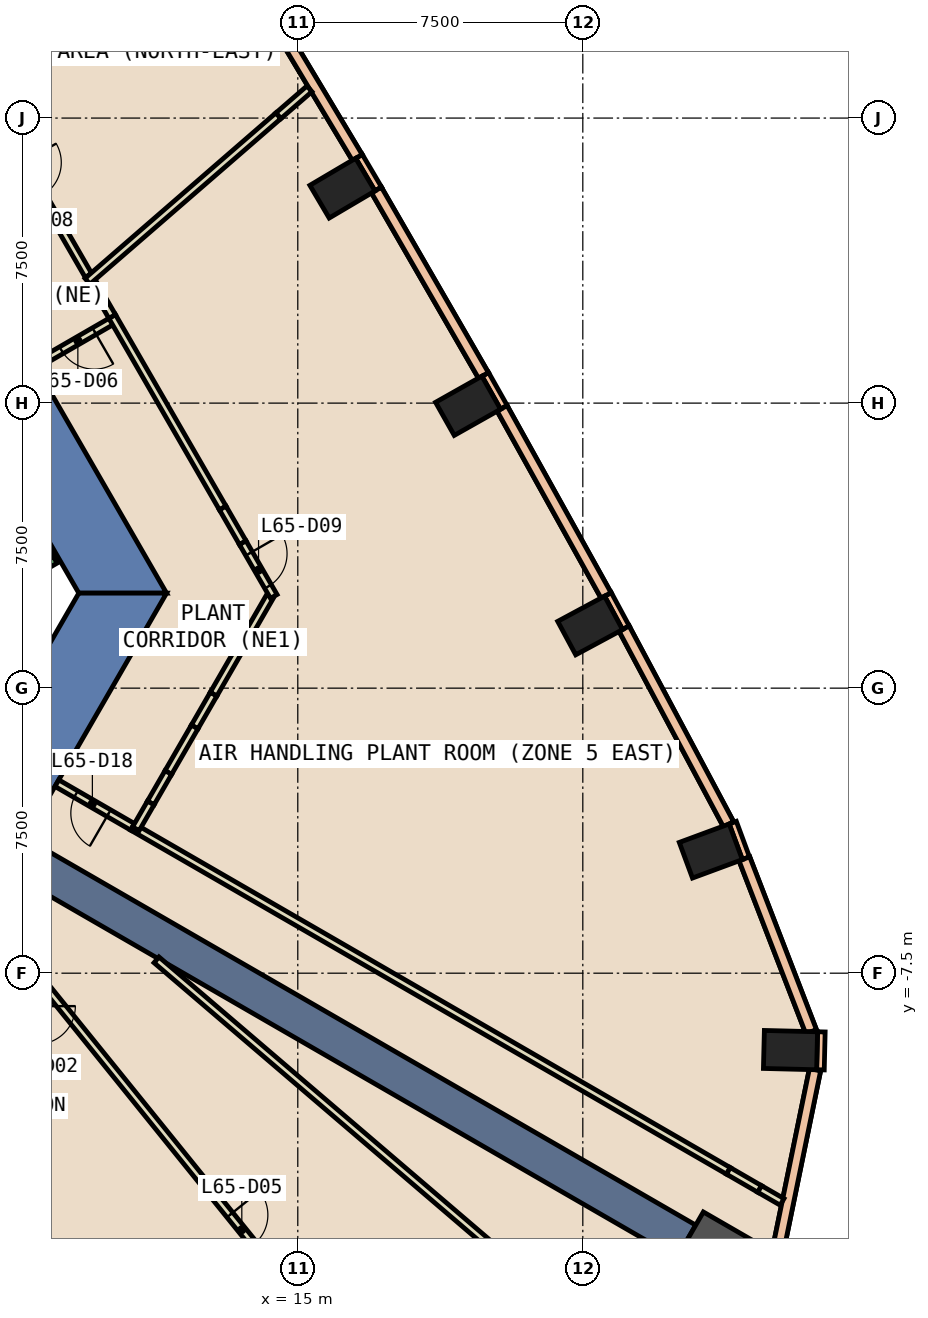
"""IFC4 building model, lengths in metres.
Left out: names, types, materials, properties, quantities, classifications, styles, units other than length and angle.
Written with IfcOpenShell. Run it as: python <this file> out.ifc"""

import sys

from ifc_helpers import new_model, si_unit, direction, frame, frame_2d, origin, origin_2d, place, context, subcontext, project, spatial, polyline, rectangle, outline, extrude, element, fill, save


model = new_model("IFC4")
c1 = context("Model", 3, precision=1e-05, world=origin(), true_north=direction((0.0, 1.0)))
c2 = subcontext(c1, "Body", "Model", "MODEL_VIEW")
j1 = project(units=[si_unit("LENGTHUNIT", "METRE"), si_unit("PLANEANGLEUNIT", "RADIAN")], contexts=[c1])
p1 = place(None, origin())
s1 = spatial("IfcSite", under=j1, at=p1, CompositionType="ELEMENT")
p2 = place(p1, origin())
s2 = spatial("IfcBuilding", under=s1, at=p2, CompositionType="ELEMENT")
p3 = place(p2, frame((0.0, 0.0, 281.0)))
s3 = spatial("IfcBuildingStorey", under=s2, at=p3, CompositionType="ELEMENT", Elevation=281.0)
p4 = place(p3, frame((26.001, -15.012, -0.6), z_axis=(0.0, 0.0, 1.0), x_axis=(-0.866025403784, 0.5, 0.0)))
e1 = element("IfcColumn", 1, at=p4, inside=s3, PredefinedType="COLUMN", context=c2, shape_type="SweptSolid", body=[
    extrude(rectangle(XDim=1.8, YDim=1.8, at=origin_2d()), origin(), (0.0, 0.0, 1.0), 5.4),
])
for number, where, z_axis, x_axis in (
    (2, (27.965, -9.524, -0.6), (0.0, 0.0, 1.0), (0.025, 1.0, 0.0)),
    (3, (25.869, -4.285, -0.6), (0.0, 0.0, 1.0), (-0.347, 0.938, 0.0)),
    (4, (22.693, 1.649, -0.6), (0.0, 0.0, 1.0), (-0.474, 0.881, 0.0)),
    (5, (19.481, 7.43, -0.6), (0.0, 0.0, 1.0), (-0.491, 0.871, 0.0)),
    (6, (16.175, 13.156, -0.6), (0.0, 0.0, 1.0), (-0.509, 0.861, 0.0)),
):
    element("IfcColumn", number, at=place(p3, frame(where, z_axis=z_axis, x_axis=x_axis)), inside=s3, PredefinedType="COLUMN", context=c2, shape_type="SweptSolid", body=[
        extrude(rectangle(XDim=1.0, YDim=1.4, at=origin_2d()), origin(), (0.0, 0.0, 1.0), 5.4),
    ])
p5 = place(p3, frame((0.0, 0.0, -0.6)))
e7 = element("IfcWall", 7, at=p5, inside=s3, PredefinedType="SHEAR", context=c2, shape_type="SweptSolid", body=[
    extrude(outline(polyline([(6.786, 10.747), (5.054, 9.747), (9.238, 2.5), (11.547, 2.5), (6.786, 10.747)])), origin(), (0.0, 0.0, 1.0), 5.4),
])
p6 = place(p3, frame((0.0, 0.0, -0.6)))
e8 = element("IfcWall", 8, at=p6, inside=s3, PredefinedType="SHEAR", context=c2, shape_type="SweptSolid", body=[
    extrude(outline(polyline([(5.774, -7.5), (11.547, 2.5), (9.238, 2.5), (4.619, -5.5), (5.774, -7.5)])), origin(), (0.0, 0.0, 1.0), 5.4),
])
p7 = place(p3, frame((7.578, -4.375, 0.0), z_axis=(0.0, 0.0, 1.0), x_axis=(0.866020754303, -0.500008053052, 0.0)))
e9 = element("IfcWall", 9, at=p7, inside=s3, PredefinedType="SHEAR", context=c2, shape_type="SweptSolid", body=[
    extrude(rectangle(XDim=20.374, YDim=1.0, at=frame_2d((10.187, 0.0))), origin(), (0.0, 0.0, 1.0), 4.8),
])
p8 = place(p3, frame((26.793, -4.477, 0.0), z_axis=(0.0, 0.0, 1.0), x_axis=(-0.346892928577, 0.937904737222, 0.0)))
e10 = element("IfcWall", 10, at=p8, inside=s3, PredefinedType="STANDARD", context=c2, shape_type="SweptSolid", body=[
    extrude(rectangle(XDim=1.0, YDim=0.2, at=frame_2d((0.5, 0.0))), origin(), (0.0, 0.0, 1.0), 4.8),
])
for number, where, z_axis, x_axis in (
    (11, (23.634, 1.588, 0.0), (0.0, 0.0, 1.0), (-0.474, 0.881, 0.0)),
    (12, (20.424, 7.387, 0.0), (0.0, 0.0, 1.0), (-0.492, 0.871, 0.0)),
):
    element("IfcWall", number, at=place(p3, frame(where, z_axis=z_axis, x_axis=x_axis)), inside=s3, PredefinedType="STANDARD", context=c2, shape_type="SweptSolid", body=[
        extrude(rectangle(XDim=1.0, YDim=0.2, at=frame_2d((0.5, 0.0))), origin(), (0.0, 0.0, 1.0), 4.8),
    ])
p9 = place(p3, frame((17.118, 13.133, 0.0), z_axis=(0.0, 0.0, 1.0), x_axis=(-0.508087253435, 0.86130560366, 0.0)))
e13 = element("IfcWall", 13, at=p9, inside=s3, PredefinedType="STANDARD", context=c2, shape_type="SweptSolid", body=[
    extrude(rectangle(XDim=1.0, YDim=0.2, at=frame_2d((0.5, 0.0))), origin(), (0.0, 0.0, 1.0), 4.8),
])
p10 = place(p3, frame((28.753, -10.043, 0.0), z_axis=(0.0, 0.0, 1.0), x_axis=(0.024186470916, 0.999707464524, 0.0)))
e14 = element("IfcWall", 14, at=p10, inside=s3, PredefinedType="STANDARD", context=c2, shape_type="SweptSolid", body=[
    extrude(rectangle(XDim=0.999, YDim=0.2, at=frame_2d((0.5, 0.0))), origin(), (0.0, 0.0, 1.0), 4.8),
])
p11 = place(p3, frame((27.613, -14.905, 0.0), z_axis=(0.0, 0.0, 1.0), x_axis=(0.200924793816, 0.979606669654, 0.0)))
e15 = element("IfcWall", 15, at=p11, inside=s3, PredefinedType="STANDARD", context=c2, shape_type="SweptSolid", body=[
    extrude(rectangle(XDim=4.967, YDim=0.3, at=frame_2d((2.484, 0.0))), origin(), (0.0, 0.0, 1.0), 1.2),
])
p12 = place(p3, frame((27.613, -14.905, 4.0), z_axis=(0.0, 0.0, 1.0), x_axis=(0.200924793816, 0.979606669654, 0.0)))
e16 = element("IfcWall", 16, at=p12, inside=s3, PredefinedType="STANDARD", context=c2, shape_type="SweptSolid", body=[
    extrude(rectangle(XDim=4.967, YDim=0.3, at=frame_2d((2.484, 0.0))), origin(), (0.0, 0.0, 1.0), 0.8),
])
p13 = place(p3, frame((28.508, -9.038, 0.0), z_axis=(0.0, 0.0, 1.0), x_axis=(-0.360267544186, 0.932849021335, 0.0)))
e17 = element("IfcWall", 17, at=p13, inside=s3, PredefinedType="STANDARD", context=c2, shape_type="SweptSolid", body=[
    extrude(rectangle(XDim=4.875, YDim=0.3, at=frame_2d((2.437, 0.0))), origin(), (0.0, 0.0, 1.0), 1.2),
])
p14 = place(p3, frame((28.508, -9.038, 4.0), z_axis=(0.0, 0.0, 1.0), x_axis=(-0.360267544186, 0.932849021335, 0.0)))
e18 = element("IfcWall", 18, at=p14, inside=s3, PredefinedType="STANDARD", context=c2, shape_type="SweptSolid", body=[
    extrude(rectangle(XDim=4.875, YDim=0.3, at=frame_2d((2.437, 0.0))), origin(), (0.0, 0.0, 1.0), 0.8),
])
p15 = place(p3, frame((26.334, -3.581, 0.0), z_axis=(0.0, 0.0, 1.0), x_axis=(-0.470796778214, 0.882241686628, 0.0)))
e19 = element("IfcWall", 19, at=p15, inside=s3, PredefinedType="STANDARD", context=c2, shape_type="SweptSolid", body=[
    extrude(rectangle(XDim=5.833, YDim=0.3, at=frame_2d((2.917, 0.0))), origin(), (0.0, 0.0, 1.0), 1.2),
])
p16 = place(p3, frame((26.334, -3.581, 4.0), z_axis=(0.0, 0.0, 1.0), x_axis=(-0.470796778214, 0.882241686628, 0.0)))
e20 = element("IfcWall", 20, at=p16, inside=s3, PredefinedType="STANDARD", context=c2, shape_type="SweptSolid", body=[
    extrude(rectangle(XDim=5.833, YDim=0.3, at=frame_2d((2.917, 0.0))), origin(), (0.0, 0.0, 1.0), 0.8),
])
p17 = place(p3, frame((23.111, 2.441, 0.0), z_axis=(0.0, 0.0, 1.0), x_axis=(-0.485665023555, 0.874145002214, 0.0)))
e21 = element("IfcWall", 21, at=p17, inside=s3, PredefinedType="STANDARD", context=c2, shape_type="SweptSolid", body=[
    extrude(rectangle(XDim=5.63, YDim=0.3, at=frame_2d((2.815, 0.0))), origin(), (0.0, 0.0, 1.0), 1.2),
])
p18 = place(p3, frame((23.111, 2.441, 4.0), z_axis=(0.0, 0.0, 1.0), x_axis=(-0.485665023555, 0.874145002214, 0.0)))
e22 = element("IfcWall", 22, at=p18, inside=s3, PredefinedType="STANDARD", context=c2, shape_type="SweptSolid", body=[
    extrude(rectangle(XDim=5.63, YDim=0.3, at=frame_2d((2.815, 0.0))), origin(), (0.0, 0.0, 1.0), 0.8),
])
p19 = place(p3, frame((19.885, 8.23, 0.0), z_axis=(0.0, 0.0, 1.0), x_axis=(-0.49997269499, 0.866041167766, 0.0)))
e23 = element("IfcWall", 23, at=p19, inside=s3, PredefinedType="STANDARD", context=c2, shape_type="SweptSolid", body=[
    extrude(rectangle(XDim=5.63, YDim=0.3, at=frame_2d((2.815, 0.0))), origin(), (0.0, 0.0, 1.0), 1.2),
])
p20 = place(p3, frame((19.885, 8.23, 4.0), z_axis=(0.0, 0.0, 1.0), x_axis=(-0.49997269499, 0.866041167766, 0.0)))
e24 = element("IfcWall", 24, at=p20, inside=s3, PredefinedType="STANDARD", context=c2, shape_type="SweptSolid", body=[
    extrude(rectangle(XDim=5.63, YDim=0.3, at=frame_2d((2.815, 0.0))), origin(), (0.0, 0.0, 1.0), 0.8),
])
p21 = place(p3, frame((16.564, 13.966, 0.0), z_axis=(0.0, 0.0, 1.0), x_axis=(-0.514272513936, 0.857626831092, 0.0)))
e25 = element("IfcWall", 25, at=p21, inside=s3, PredefinedType="STANDARD", context=c2, shape_type="SweptSolid", body=[
    extrude(rectangle(XDim=5.629, YDim=0.3, at=frame_2d((2.815, 0.0))), origin(), (0.0, 0.0, 1.0), 1.2),
])
p22 = place(p3, frame((16.564, 13.966, 4.0), z_axis=(0.0, 0.0, 1.0), x_axis=(-0.514272513936, 0.857626831092, 0.0)))
e26 = element("IfcWall", 26, at=p22, inside=s3, PredefinedType="STANDARD", context=c2, shape_type="SweptSolid", body=[
    extrude(rectangle(XDim=5.629, YDim=0.3, at=frame_2d((2.815, 0.0))), origin(), (0.0, 0.0, 1.0), 0.8),
])
p23 = place(p3, frame((8.084, -7.51, 0.0), z_axis=(0.0, 0.0, 1.0), x_axis=(0.628300137945, -0.777971038445, 0.0)))
e27 = element("IfcWall", 27, at=p23, inside=s3, PredefinedType="PARTITIONING", context=c2, shape_type="SweptSolid", body=[
    extrude(rectangle(XDim=16.141, YDim=0.2, at=frame_2d((8.07, 0.0))), origin(), (0.0, 0.0, 1.0), 4.8),
])
p24 = place(p23, frame((8.163, 0.0, 0.0)))
e28 = element("IfcOpeningElement", 28, at=p24, cuts=e27, PredefinedType="OPENING", context=c2, shape_type="SweptSolid", body=[
    extrude(rectangle(XDim=1.0, YDim=2.1, at=frame_2d((0.5, 1.05))), frame((0.0, 0.11, 0.0), z_axis=(0.0, -1.0, 0.0), x_axis=(1.0, 0.0, 0.0)), (0.0, 0.0, 1.0), 0.22),
])
p25 = place(p3, frame((11.282, -7.149, 0.0), z_axis=(0.0, 0.0, 1.0), x_axis=(0.759981627741, -0.64994455571, 0.0)))
e29 = element("IfcWall", 29, at=p25, inside=s3, PredefinedType="PARTITIONING", context=c2, shape_type="SweptSolid", body=[
    extrude(rectangle(XDim=17.222, YDim=0.2, at=frame_2d((8.611, 0.0))), origin(), (0.0, 0.0, 1.0), 4.8),
])
p26 = place(p3, frame((10.652, -3.65, 0.0), z_axis=(0.0, 0.0, 1.0), x_axis=(-0.866079547155, 0.499906209203, 0.0)))
e30 = element("IfcWall", 30, at=p26, inside=s3, PredefinedType="PARTITIONING", context=c2, shape_type="SweptSolid", body=[
    extrude(rectangle(XDim=2.3, YDim=0.2, at=frame_2d((1.15, 0.0))), origin(), (0.0, 0.0, 1.0), 4.8),
])
p27 = place(p26, frame((0.721, 0.0, 0.0)))
e31 = element("IfcOpeningElement", 31, at=p27, cuts=e30, PredefinedType="OPENING", context=c2, shape_type="SweptSolid", body=[
    extrude(rectangle(XDim=1.0, YDim=2.1, at=frame_2d((0.5, 1.05))), frame((0.0, 0.11, 0.0), z_axis=(0.0, -1.0, 0.0), x_axis=(1.0, 0.0, 0.0)), (0.0, 0.0, 1.0), 0.22),
])
p28 = place(p3, frame((10.652, -3.65, 0.0), z_axis=(0.0, 0.0, 1.0), x_axis=(0.86603131093, -0.499989768384, 0.0)))
e32 = element("IfcWall", 32, at=p28, inside=s3, PredefinedType="PARTITIONING", context=c2, shape_type="SweptSolid", body=[
    extrude(rectangle(XDim=18.104, YDim=0.2, at=frame_2d((9.052, 0.0))), origin(), (0.0, 0.0, 1.0), 4.8),
])
p29 = place(p3, frame((10.165, 9.693, 0.0), z_axis=(0.0, 0.0, 1.0), x_axis=(-0.865955154139, -0.50012165622, 0.0)))
e33 = element("IfcWall", 33, at=p29, inside=s3, PredefinedType="PARTITIONING", context=c2, shape_type="SweptSolid", body=[
    extrude(rectangle(XDim=2.4, YDim=0.2, at=frame_2d((1.2, 0.0))), origin(), (0.0, 0.0, 1.0), 2.4),
])
p30 = place(p29, frame((0.6, 0.0, 0.0)))
e34 = element("IfcOpeningElement", 34, at=p30, cuts=e33, PredefinedType="OPENING", context=c2, shape_type="SweptSolid", body=[
    extrude(rectangle(XDim=1.0, YDim=2.1, at=frame_2d((0.5, 1.05))), frame((0.0, 0.11, 0.0), z_axis=(0.0, -1.0, 0.0), x_axis=(1.0, 0.0, 0.0)), (0.0, 0.0, 1.0), 0.22),
])
p31 = place(p3, frame((9.592, 10.685, 0.0), z_axis=(0.0, 0.0, 1.0), x_axis=(0.500366091518, -0.865813937552, 0.0)))
e35 = element("IfcWall", 35, at=p31, inside=s3, PredefinedType="PARTITIONING", context=c2, shape_type="SweptSolid", body=[
    extrude(rectangle(XDim=0.23, YDim=0.2, at=frame_2d((0.115, 0.0))), origin(), (0.0, 0.0, 1.0), 4.8),
])
p32 = place(p3, frame((14.268, 2.413, 0.0), z_axis=(0.0, 0.0, 1.0), x_axis=(-0.500037910135, -0.866003515251, 0.0)))
e36 = element("IfcWall", 36, at=p32, inside=s3, PredefinedType="PARTITIONING", context=c2, shape_type="SweptSolid", body=[
    extrude(rectangle(XDim=2.97, YDim=0.2, at=frame_2d((1.485, 0.0))), origin(), (0.0, 0.0, 1.0), 4.8),
])
p33 = place(p3, frame((10.115, 9.78, 0.0), z_axis=(0.0, 0.0, 1.0), x_axis=(0.500005696091, -0.86602211512, 0.0)))
e37 = element("IfcWall", 37, at=p33, inside=s3, PredefinedType="PARTITIONING", context=c2, shape_type="SweptSolid", body=[
    extrude(rectangle(XDim=5.82, YDim=0.2, at=frame_2d((2.91, 0.0))), origin(), (0.0, 0.0, 1.0), 2.4),
])
p34 = place(p3, frame((15.307, 15.77, 0.0), z_axis=(0.0, 0.0, 1.0), x_axis=(-0.755555277279, -0.655084897533, 0.0)))
e38 = element("IfcWall", 38, at=p34, inside=s3, PredefinedType="PARTITIONING", context=c2, shape_type="SweptSolid", body=[
    extrude(rectangle(XDim=1.084, YDim=0.2, at=frame_2d((0.542, 0.0))), origin(), (0.0, 0.0, 1.0), 2.4),
])
p35 = place(p3, frame((26.331, -12.702, 0.0), z_axis=(0.0, 0.0, 1.0), x_axis=(0.865607892982, -0.500722453668, 0.0)))
e39 = element("IfcWall", 39, at=p35, inside=s3, PredefinedType="PARTITIONING", context=c2, shape_type="SweptSolid", body=[
    extrude(rectangle(XDim=0.951, YDim=0.2, at=frame_2d((0.475, 0.0))), origin(), (0.0, 0.0, 1.0), 2.4),
])
p36 = place(p3, frame((27.154, -13.178, 0.0), z_axis=(0.0, 0.0, 1.0), x_axis=(0.866316887664, -0.499494794916, 0.0)))
e40 = element("IfcWall", 40, at=p36, inside=s3, PredefinedType="PARTITIONING", context=c2, shape_type="SweptSolid", body=[
    extrude(rectangle(XDim=0.681, YDim=0.2, at=frame_2d((0.34, 0.0))), origin(), (0.0, 0.0, 1.0), 4.8),
])
p37 = place(p3, frame((6.871, 15.398, 0.0), z_axis=(0.0, 0.0, 1.0), x_axis=(0.500031573455, -0.866007174074, 0.0)))
e41 = element("IfcWall", 41, at=p37, inside=s3, PredefinedType="PARTITIONING", context=c2, shape_type="SweptSolid", body=[
    extrude(rectangle(XDim=5.241, YDim=0.2, at=frame_2d((2.621, 0.0))), origin(), (0.0, 0.0, 1.0), 4.8),
])
p38 = place(p37, frame((1.811, 0.0, 0.0)))
e42 = element("IfcOpeningElement", 42, at=p38, cuts=e41, PredefinedType="OPENING", context=c2, shape_type="SweptSolid", body=[
    extrude(rectangle(XDim=1.0, YDim=2.1, at=frame_2d((0.5, 1.05))), frame((0.0, 0.11, 0.0), z_axis=(0.0, -1.0, 0.0), x_axis=(1.0, 0.0, 0.0)), (0.0, 0.0, 1.0), 0.22),
])
p39 = place(p3, frame((9.707, 10.486, 0.0), z_axis=(0.0, 0.0, 1.0), x_axis=(0.500292562113, -0.865856427068, 0.0)))
e43 = element("IfcWall", 43, at=p39, inside=s3, PredefinedType="PARTITIONING", context=c2, shape_type="SweptSolid", body=[
    extrude(rectangle(XDim=0.815, YDim=0.2, at=frame_2d((0.408, 0.0))), origin(), (0.0, 0.0, 1.0), 2.4),
])
p40 = place(p3, frame((12.783, -0.159, 0.0), z_axis=(0.0, 0.0, 1.0), x_axis=(-0.499517125168, -0.866304012263, 0.0)))
e44 = element("IfcWall", 44, at=p40, inside=s3, PredefinedType="PARTITIONING", context=c2, shape_type="SweptSolid", body=[
    extrude(rectangle(XDim=0.995, YDim=0.2, at=frame_2d((0.498, 0.0))), origin(), (0.0, 0.0, 1.0), 2.4),
])
p41 = place(p3, frame((12.286, -1.021, 0.0), z_axis=(0.0, 0.0, 1.0), x_axis=(-0.500348091332, -0.865824339864, 0.0)))
e45 = element("IfcWall", 45, at=p41, inside=s3, PredefinedType="PARTITIONING", context=c2, shape_type="SweptSolid", body=[
    extrude(rectangle(XDim=1.385, YDim=0.2, at=frame_2d((0.692, 0.0))), origin(), (0.0, 0.0, 1.0), 4.8),
])
p42 = place(p3, frame((11.593, -2.22, 0.0), z_axis=(0.0, 0.0, 1.0), x_axis=(-0.499547203848, -0.866286667984, 0.0)))
e46 = element("IfcWall", 46, at=p42, inside=s3, PredefinedType="PARTITIONING", context=c2, shape_type="SweptSolid", body=[
    extrude(rectangle(XDim=0.925, YDim=0.2, at=frame_2d((0.462, 0.0))), origin(), (0.0, 0.0, 1.0), 2.4),
])
p43 = place(p3, frame((11.131, -3.021, 0.0), z_axis=(0.0, 0.0, 1.0), x_axis=(-0.500090821976, -0.865972961342, 0.0)))
e47 = element("IfcWall", 47, at=p43, inside=s3, PredefinedType="PARTITIONING", context=c2, shape_type="SweptSolid", body=[
    extrude(rectangle(XDim=0.784, YDim=0.2, at=frame_2d((0.392, 0.0))), origin(), (0.0, 0.0, 1.0), 4.8),
])
p44 = place(p3, frame((13.025, 4.74, 0.0), z_axis=(0.0, 0.0, 1.0), x_axis=(0.499548844452, -0.866285721922, 0.0)))
e48 = element("IfcWall", 48, at=p44, inside=s3, PredefinedType="PARTITIONING", context=c2, shape_type="SweptSolid", body=[
    extrude(rectangle(XDim=1.055, YDim=0.2, at=frame_2d((0.528, 0.0))), origin(), (0.0, 0.0, 1.0), 2.4),
])
p45 = place(p3, frame((13.552, 3.826, 0.0), z_axis=(0.0, 0.0, 1.0), x_axis=(0.500098085174, -0.865968766876, 0.0)))
e49 = element("IfcWall", 49, at=p45, inside=s3, PredefinedType="PARTITIONING", context=c2, shape_type="SweptSolid", body=[
    extrude(rectangle(XDim=1.632, YDim=0.2, at=frame_2d((0.816, 0.0))), origin(), (0.0, 0.0, 1.0), 4.8),
])
p46 = place(p45, frame((0.331, 0.0, 0.0)))
e50 = element("IfcOpeningElement", 50, at=p46, cuts=e49, PredefinedType="OPENING", context=c2, shape_type="SweptSolid", body=[
    extrude(rectangle(XDim=1.0, YDim=2.1, at=frame_2d((0.5, 1.05))), frame((0.0, 0.11, 0.0), z_axis=(0.0, -1.0, 0.0), x_axis=(1.0, 0.0, 0.0)), (0.0, 0.0, 1.0), 0.22),
])
p47 = place(p3, frame((14.488, 15.06, 0.0), z_axis=(0.0, 0.0, 1.0), x_axis=(-0.755567874399, -0.65507036811, 0.0)))
e51 = element("IfcWall", 51, at=p47, inside=s3, PredefinedType="PARTITIONING", context=c2, shape_type="SweptSolid", body=[
    extrude(rectangle(XDim=6.647, YDim=0.2, at=frame_2d((3.323, 0.0))), origin(), (0.0, 0.0, 1.0), 4.8),
])
p48 = place(p3, frame((4.806, 1.176, 0.0), z_axis=(0.0, 0.0, 1.0), x_axis=(0.866059941101, 0.499940174841, 0.0)))
e52 = element("IfcWall", 52, at=p48, inside=s3, PredefinedType="STANDARD", context=c2, shape_type="SweptSolid", body=[
    extrude(rectangle(XDim=4.4, YDim=0.2, at=frame_2d((2.2, 0.0))), origin(), (0.0, 0.0, 1.0), 4.8),
])
p49 = place(p48, frame((2.4, 0.0, 0.0)))
e53 = element("IfcOpeningElement", 53, at=p49, cuts=e52, PredefinedType="OPENING", context=c2, shape_type="SweptSolid", body=[
    extrude(rectangle(XDim=1.1, YDim=2.2, at=frame_2d((0.55, 1.1))), frame((0.0, 0.11, 0.0), z_axis=(0.0, -1.0, 0.0), x_axis=(1.0, 0.0, 0.0)), (0.0, 0.0, 1.0), 0.22),
])
p50 = place(p3, frame((8.48, 3.412, 0.0), z_axis=(0.0, 0.0, 1.0), x_axis=(-0.499978703459, 0.866037698999, 0.0)))
e54 = element("IfcWall", 54, at=p50, inside=s3, PredefinedType="STANDARD", context=c2, shape_type="SweptSolid", body=[
    extrude(rectangle(XDim=6.9, YDim=0.2, at=frame_2d((3.45, 0.0))), origin(), (0.0, 0.0, 1.0), 4.8),
])
p51 = place(p24, origin())
e55 = element("IfcDoor", 55, at=p51, inside=s3, OperationType="SINGLE_SWING_RIGHT", PredefinedType="DOOR", context=c2, shape_type="SweptSolid", body=[
    extrude(rectangle(XDim=1.0, YDim=2.1, at=frame_2d((0.5, 1.05))), frame((0.0, 0.025, 0.0), z_axis=(0.0, -1.0, 0.0), x_axis=(1.0, 0.0, 0.0)), (0.0, 0.0, 1.0), 0.05),
])
fill(e28, e55)
p52 = place(p30, origin())
e56 = element("IfcDoor", 56, at=p52, inside=s3, OperationType="SINGLE_SWING_LEFT", PredefinedType="DOOR", context=c2, shape_type="SweptSolid", body=[
    extrude(rectangle(XDim=1.0, YDim=2.1, at=frame_2d((0.5, 1.05))), frame((0.0, 0.025, 0.0), z_axis=(0.0, -1.0, 0.0), x_axis=(1.0, 0.0, 0.0)), (0.0, 0.0, 1.0), 0.05),
])
fill(e34, e56)
p53 = place(p46, origin())
e57 = element("IfcDoor", 57, at=p53, inside=s3, OperationType="SINGLE_SWING_RIGHT", PredefinedType="DOOR", context=c2, shape_type="SweptSolid", body=[
    extrude(rectangle(XDim=1.0, YDim=2.1, at=frame_2d((0.5, 1.05))), frame((0.0, 0.025, 0.0), z_axis=(0.0, -1.0, 0.0), x_axis=(1.0, 0.0, 0.0)), (0.0, 0.0, 1.0), 0.05),
])
fill(e50, e57)
p54 = place(p27, origin())
e58 = element("IfcDoor", 58, at=p54, inside=s3, OperationType="SINGLE_SWING_LEFT", PredefinedType="DOOR", context=c2, shape_type="SweptSolid", body=[
    extrude(rectangle(XDim=1.0, YDim=2.1, at=frame_2d((0.5, 1.05))), frame((0.0, 0.025, 0.0), z_axis=(0.0, -1.0, 0.0), x_axis=(1.0, 0.0, 0.0)), (0.0, 0.0, 1.0), 0.05),
])
fill(e31, e58)
save(model, sys.argv[1])
